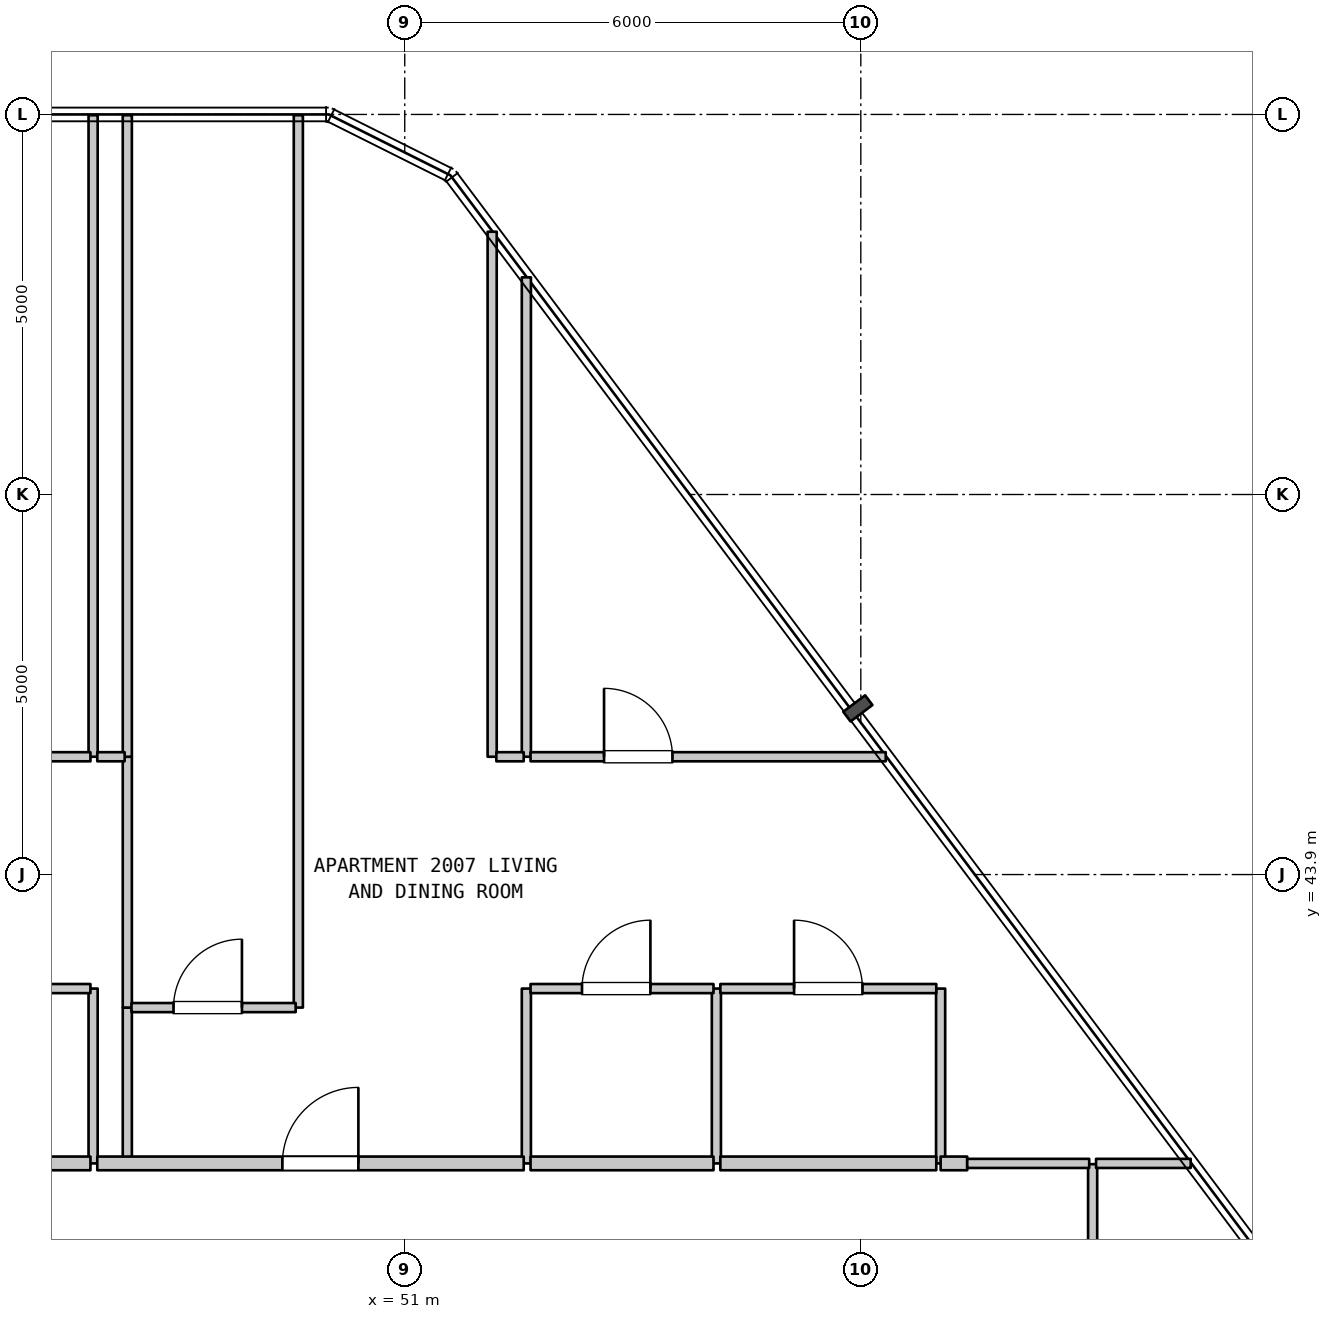
"""IFC4 building model, lengths in metres.
Left out: names, types, materials, properties, quantities, classifications, styles, units other than length and angle.
Written with IfcOpenShell. Run it as: python <this file> out.ifc"""

import sys

from ifc_helpers import new_model, si_unit, direction, frame, frame_2d, origin, place, context, subcontext, project, spatial, rectangle, extrude, element, fill, save


model = new_model("IFC4")
c1 = context("Model", 3, precision=1e-05, world=origin(), true_north=direction((0.0, 1.0)))
c2 = subcontext(c1, "Body", "Model", "MODEL_VIEW")
j1 = project(units=[si_unit("LENGTHUNIT", "METRE"), si_unit("PLANEANGLEUNIT", "RADIAN")], contexts=[c1])
p1 = place(None, origin())
s1 = spatial("IfcSite", under=j1, at=p1, CompositionType="ELEMENT")
p2 = place(p1, origin())
s2 = spatial("IfcBuilding", under=s1, at=p2, CompositionType="ELEMENT")
p3 = place(p2, frame((0.0, 0.0, 86.4)))
s3 = spatial("IfcBuildingStorey", under=s2, at=p3, CompositionType="ELEMENT", Elevation=86.4)
p4 = place(p3, frame((46.9, 40.1, 0.0), z_axis=(0.0, 0.0, 1.0), x_axis=(0.0, 1.0, 0.0)))
e1 = element("IfcWall", 1, at=p4, inside=s3, PredefinedType="PARTITIONING", context=c2, shape_type="SweptSolid", body=[
    extrude(rectangle(XDim=2.3, YDim=0.12, at=frame_2d((1.15, 0.0))), origin(), (0.0, 0.0, 1.0), 4.185),
])
p5 = place(p3, frame((46.9, 45.45, 0.0), z_axis=(0.0, 0.0, 1.0), x_axis=(0.0, 1.0, 0.0)))
e2 = element("IfcWall", 2, at=p5, inside=s3, PredefinedType="PARTITIONING", context=c2, shape_type="SweptSolid", body=[
    extrude(rectangle(XDim=8.44, YDim=0.12, at=frame_2d((4.22, 0.0))), origin(), (0.0, 0.0, 1.0), 4.185),
])
p6 = place(p3, frame((47.35, 40.1, 0.0), z_axis=(0.0, 0.0, 1.0), x_axis=(0.0, 1.0, 0.0)))
e3 = element("IfcWall", 3, at=p6, inside=s3, PredefinedType="PARTITIONING", context=c2, shape_type="SweptSolid", body=[
    extrude(rectangle(XDim=2.05, YDim=0.12, at=frame_2d((1.025, 0.0))), origin(), (0.0, 0.0, 1.0), 4.185),
])
p7 = place(p3, frame((47.35, 42.15, 0.0), z_axis=(0.0, 0.0, 1.0), x_axis=(0.0, 1.0, 0.0)))
e4 = element("IfcWall", 4, at=p7, inside=s3, PredefinedType="PARTITIONING", context=c2, shape_type="SweptSolid", body=[
    extrude(rectangle(XDim=3.3, YDim=0.12, at=frame_2d((1.65, 0.0))), origin(), (0.0, 0.0, 1.0), 4.185),
])
p8 = place(p3, frame((47.35, 45.45, 0.0), z_axis=(0.0, 0.0, 1.0), x_axis=(0.0, 1.0, 0.0)))
e5 = element("IfcWall", 5, at=p8, inside=s3, PredefinedType="PARTITIONING", context=c2, shape_type="SweptSolid", body=[
    extrude(rectangle(XDim=8.44, YDim=0.12, at=frame_2d((4.22, 0.0))), origin(), (0.0, 0.0, 1.0), 4.185),
])
p9 = place(p3, frame((49.6, 42.15, 0.0), z_axis=(0.0, 0.0, 1.0), x_axis=(0.0, 1.0, 0.0)))
e6 = element("IfcWall", 6, at=p9, inside=s3, PredefinedType="PARTITIONING", context=c2, shape_type="SweptSolid", body=[
    extrude(rectangle(XDim=11.74, YDim=0.12, at=frame_2d((5.87, 0.0))), origin(), (0.0, 0.0, 1.0), 4.185),
])
p10 = place(p3, frame((52.15, 45.45, 0.0), z_axis=(0.0, 0.0, 1.0), x_axis=(0.0, 1.0, 0.0)))
e7 = element("IfcWall", 7, at=p10, inside=s3, PredefinedType="PARTITIONING", context=c2, shape_type="SweptSolid", body=[
    extrude(rectangle(XDim=6.907, YDim=0.12, at=frame_2d((3.454, 0.0))), origin(), (0.0, 0.0, 1.0), 4.185),
])
p11 = place(p3, frame((52.6, 40.1, 0.0), z_axis=(0.0, 0.0, 1.0), x_axis=(0.0, 1.0, 0.0)))
e8 = element("IfcWall", 8, at=p11, inside=s3, PredefinedType="PARTITIONING", context=c2, shape_type="SweptSolid", body=[
    extrude(rectangle(XDim=2.3, YDim=0.12, at=frame_2d((1.15, 0.0))), origin(), (0.0, 0.0, 1.0), 4.185),
])
p12 = place(p3, frame((52.6, 45.45, 0.0), z_axis=(0.0, 0.0, 1.0), x_axis=(0.0, 1.0, 0.0)))
e9 = element("IfcWall", 9, at=p12, inside=s3, PredefinedType="PARTITIONING", context=c2, shape_type="SweptSolid", body=[
    extrude(rectangle(XDim=6.307, YDim=0.12, at=frame_2d((3.154, 0.0))), origin(), (0.0, 0.0, 1.0), 4.185),
])
for number, where, z_axis, x_axis in (
    (10, (55.1, 40.1, 0.0), (0.0, 0.0, 1.0), (0.0, 1.0, 0.0)),
    (11, (58.05, 40.1, 0.0), (0.0, 0.0, 1.0), (0.0, 1.0, 0.0)),
):
    element("IfcWall", number, at=place(p3, frame(where, z_axis=z_axis, x_axis=x_axis)), inside=s3, PredefinedType="PARTITIONING", context=c2, shape_type="SweptSolid", body=[
        extrude(rectangle(XDim=2.3, YDim=0.12, at=frame_2d((1.15, 0.0))), origin(), (0.0, 0.0, 1.0), 4.185),
    ])
p13 = place(p3, frame((60.05, 37.89, 0.0), z_axis=(0.0, 0.0, 1.0), x_axis=(0.0, 1.0, 0.0)))
e12 = element("IfcWall", 12, at=p13, inside=s3, PredefinedType="PARTITIONING", context=c2, shape_type="SweptSolid", body=[
    extrude(rectangle(XDim=2.2, YDim=0.12, at=frame_2d((1.1, 0.0))), origin(), (0.0, 0.0, 1.0), 4.185),
])
p14 = place(p3, frame((43.888, 40.1, 0.0), z_axis=(0.0, 0.0, 1.0), x_axis=(1.0, 0.0, 0.0)))
e13 = element("IfcWall", 13, at=p14, inside=s3, PredefinedType="STANDARD", context=c2, shape_type="SweptSolid", body=[
    extrude(rectangle(XDim=2.977, YDim=0.18, at=frame_2d((1.489, 0.0))), origin(), (0.0, 0.0, 1.0), 4.185),
])
p15 = place(p3, frame((46.955, 40.1, 0.0), z_axis=(0.0, 0.0, 1.0), x_axis=(1.0, 0.0, 0.0)))
e14 = element("IfcWall", 14, at=p15, inside=s3, PredefinedType="STANDARD", context=c2, shape_type="SweptSolid", body=[
    extrude(rectangle(XDim=5.61, YDim=0.18, at=frame_2d((2.805, 0.0))), origin(), (0.0, 0.0, 1.0), 4.185),
])
p16 = place(p15, frame((2.435, 0.0, 0.0)))
e15 = element("IfcOpeningElement", 15, at=p16, cuts=e14, PredefinedType="OPENING", context=c2, shape_type="SweptSolid", body=[
    extrude(rectangle(XDim=1.0, YDim=2.15, at=frame_2d((0.5, 1.075))), frame((0.0, 0.1, 0.0), z_axis=(0.0, -1.0, 0.0), x_axis=(1.0, 0.0, 0.0)), (0.0, 0.0, 1.0), 0.2),
])
p17 = place(p3, frame((52.655, 40.1, 0.0), z_axis=(0.0, 0.0, 1.0), x_axis=(1.0, 0.0, 0.0)))
e16 = element("IfcWall", 16, at=p17, inside=s3, PredefinedType="STANDARD", context=c2, shape_type="SweptSolid", body=[
    extrude(rectangle(XDim=2.407, YDim=0.18, at=frame_2d((1.204, 0.0))), origin(), (0.0, 0.0, 1.0), 4.185),
])
p18 = place(p3, frame((55.152, 40.1, 0.0), z_axis=(0.0, 0.0, 1.0), x_axis=(1.0, 0.0, 0.0)))
e17 = element("IfcWall", 17, at=p18, inside=s3, PredefinedType="STANDARD", context=c2, shape_type="SweptSolid", body=[
    extrude(rectangle(XDim=2.841, YDim=0.18, at=frame_2d((1.42, 0.0))), origin(), (0.0, 0.0, 1.0), 4.185),
])
p19 = place(p3, frame((58.05, 40.1, 0.0), z_axis=(0.0, 0.0, 1.0), x_axis=(1.0, 0.0, 0.0)))
e18 = element("IfcWall", 18, at=p19, inside=s3, PredefinedType="STANDARD", context=c2, shape_type="SweptSolid", body=[
    extrude(rectangle(XDim=0.35, YDim=0.18, at=frame_2d((0.175, 0.0))), origin(), (0.0, 0.0, 1.0), 4.185),
])
p20 = place(p3, frame((58.4, 40.1, 0.0), z_axis=(0.0, 0.0, 1.0), x_axis=(1.0, 0.0, 0.0)))
e19 = element("IfcWall", 19, at=p20, inside=s3, PredefinedType="PARTITIONING", context=c2, shape_type="SweptSolid", body=[
    extrude(rectangle(XDim=1.605, YDim=0.12, at=frame_2d((0.802, 0.0))), origin(), (0.0, 0.0, 1.0), 4.185),
])
p21 = place(p3, frame((60.095, 40.1, 0.0), z_axis=(0.0, 0.0, 1.0), x_axis=(1.0, 0.0, 0.0)))
e20 = element("IfcWall", 20, at=p21, inside=s3, PredefinedType="PARTITIONING", context=c2, shape_type="SweptSolid", body=[
    extrude(rectangle(XDim=1.245, YDim=0.12, at=frame_2d((0.623, 0.0))), origin(), (0.0, 0.0, 1.0), 4.185),
])
p22 = place(p3, frame((47.405, 42.15, 0.0), z_axis=(0.0, 0.0, 1.0), x_axis=(1.0, 0.0, 0.0)))
e21 = element("IfcWall", 21, at=p22, inside=s3, PredefinedType="PARTITIONING", context=c2, shape_type="SweptSolid", body=[
    extrude(rectangle(XDim=2.16, YDim=0.12, at=frame_2d((1.08, 0.0))), origin(), (0.0, 0.0, 1.0), 4.185),
])
p23 = place(p22, frame((0.553, 0.0, 0.0)))
e22 = element("IfcOpeningElement", 22, at=p23, cuts=e21, PredefinedType="OPENING", context=c2, shape_type="SweptSolid", body=[
    extrude(rectangle(XDim=0.9, YDim=2.15, at=frame_2d((0.45, 1.075))), frame((0.0, 0.07, 0.0), z_axis=(0.0, -1.0, 0.0), x_axis=(1.0, 0.0, 0.0)), (0.0, 0.0, 1.0), 0.14),
])
p24 = place(p3, frame((43.888, 42.4, 0.0), z_axis=(0.0, 0.0, 1.0), x_axis=(1.0, 0.0, 0.0)))
e23 = element("IfcWall", 23, at=p24, inside=s3, PredefinedType="PARTITIONING", context=c2, shape_type="SweptSolid", body=[
    extrude(rectangle(XDim=2.977, YDim=0.12, at=frame_2d((1.489, 0.0))), origin(), (0.0, 0.0, 1.0), 4.185),
])
p25 = place(p24, frame((0.964, 0.0, 0.0)))
e24 = element("IfcOpeningElement", 24, at=p25, cuts=e23, PredefinedType="OPENING", context=c2, shape_type="SweptSolid", body=[
    extrude(rectangle(XDim=0.9, YDim=2.15, at=frame_2d((0.45, 1.075))), frame((0.0, 0.07, 0.0), z_axis=(0.0, -1.0, 0.0), x_axis=(1.0, 0.0, 0.0)), (0.0, 0.0, 1.0), 0.14),
])
p26 = place(p3, frame((52.655, 42.4, 0.0), z_axis=(0.0, 0.0, 1.0), x_axis=(1.0, 0.0, 0.0)))
e25 = element("IfcWall", 25, at=p26, inside=s3, PredefinedType="PARTITIONING", context=c2, shape_type="SweptSolid", body=[
    extrude(rectangle(XDim=2.407, YDim=0.12, at=frame_2d((1.204, 0.0))), origin(), (0.0, 0.0, 1.0), 4.185),
])
p27 = place(p26, frame((0.677, 0.0, 0.0)))
e26 = element("IfcOpeningElement", 26, at=p27, cuts=e25, PredefinedType="OPENING", context=c2, shape_type="SweptSolid", body=[
    extrude(rectangle(XDim=0.9, YDim=2.15, at=frame_2d((0.45, 1.075))), frame((0.0, 0.07, 0.0), z_axis=(0.0, -1.0, 0.0), x_axis=(1.0, 0.0, 0.0)), (0.0, 0.0, 1.0), 0.14),
])
p28 = place(p3, frame((55.152, 42.4, 0.0), z_axis=(0.0, 0.0, 1.0), x_axis=(1.0, 0.0, 0.0)))
e27 = element("IfcWall", 27, at=p28, inside=s3, PredefinedType="PARTITIONING", context=c2, shape_type="SweptSolid", body=[
    extrude(rectangle(XDim=2.841, YDim=0.12, at=frame_2d((1.42, 0.0))), origin(), (0.0, 0.0, 1.0), 4.185),
])
p29 = place(p28, frame((0.97, 0.0, 0.0)))
e28 = element("IfcOpeningElement", 28, at=p29, cuts=e27, PredefinedType="OPENING", context=c2, shape_type="SweptSolid", body=[
    extrude(rectangle(XDim=0.9, YDim=2.1, at=frame_2d((0.45, 1.05))), frame((0.0, 0.07, 0.0), z_axis=(0.0, -1.0, 0.0), x_axis=(1.0, 0.0, 0.0)), (0.0, 0.0, 1.0), 0.14),
])
p30 = place(p3, frame((38.755, 45.45, 0.0), z_axis=(0.0, 0.0, 1.0), x_axis=(1.0, 0.0, 0.0)))
e29 = element("IfcWall", 29, at=p30, inside=s3, PredefinedType="PARTITIONING", context=c2, shape_type="SweptSolid", body=[
    extrude(rectangle(XDim=8.11, YDim=0.12, at=frame_2d((4.055, 0.0))), origin(), (0.0, 0.0, 1.0), 4.185),
])
p31 = place(p30, frame((0.975, 0.0, 0.0)))
e30 = element("IfcOpeningElement", 30, at=p31, cuts=e29, PredefinedType="OPENING", context=c2, shape_type="SweptSolid", body=[
    extrude(rectangle(XDim=0.9, YDim=2.15, at=frame_2d((0.45, 1.075))), frame((0.0, 0.07, 0.0), z_axis=(0.0, -1.0, 0.0), x_axis=(1.0, 0.0, 0.0)), (0.0, 0.0, 1.0), 0.14),
])
p32 = place(p30, frame((3.531, 0.0, 0.0)))
e31 = element("IfcOpeningElement", 31, at=p32, cuts=e29, PredefinedType="OPENING", context=c2, shape_type="SweptSolid", body=[
    extrude(rectangle(XDim=0.9, YDim=2.15, at=frame_2d((0.45, 1.075))), frame((0.0, 0.07, 0.0), z_axis=(0.0, -1.0, 0.0), x_axis=(1.0, 0.0, 0.0)), (0.0, 0.0, 1.0), 0.14),
])
p33 = place(p30, frame((6.092, 0.0, 0.0)))
e32 = element("IfcOpeningElement", 32, at=p33, cuts=e29, PredefinedType="OPENING", context=c2, shape_type="SweptSolid", body=[
    extrude(rectangle(XDim=0.9, YDim=2.15, at=frame_2d((0.45, 1.075))), frame((0.0, 0.07, 0.0), z_axis=(0.0, -1.0, 0.0), x_axis=(1.0, 0.0, 0.0)), (0.0, 0.0, 1.0), 0.14),
])
for number, where, z_axis, x_axis in (
    (33, (46.955, 45.45, 0.0), (0.0, 0.0, 1.0), (1.0, 0.0, 0.0)),
    (34, (52.205, 45.45, 0.0), (0.0, 0.0, 1.0), (1.0, 0.0, 0.0)),
):
    element("IfcWall", number, at=place(p3, frame(where, z_axis=z_axis, x_axis=x_axis)), inside=s3, PredefinedType="PARTITIONING", context=c2, shape_type="SweptSolid", body=[
        extrude(rectangle(XDim=0.36, YDim=0.12, at=frame_2d((0.18, 0.0))), origin(), (0.0, 0.0, 1.0), 4.185),
    ])
p34 = place(p3, frame((52.655, 45.45, 0.0), z_axis=(0.0, 0.0, 1.0), x_axis=(1.0, 0.0, 0.0)))
e35 = element("IfcWall", 35, at=p34, inside=s3, PredefinedType="PARTITIONING", context=c2, shape_type="SweptSolid", body=[
    extrude(rectangle(XDim=4.673, YDim=0.12, at=frame_2d((2.336, 0.0))), origin(), (0.0, 0.0, 1.0), 4.185),
])
p35 = place(p34, frame((0.967, 0.0, 0.0)))
e36 = element("IfcOpeningElement", 36, at=p35, cuts=e35, PredefinedType="OPENING", context=c2, shape_type="SweptSolid", body=[
    extrude(rectangle(XDim=0.9, YDim=2.15, at=frame_2d((0.45, 1.075))), frame((0.0, 0.07, 0.0), z_axis=(0.0, -1.0, 0.0), x_axis=(1.0, 0.0, 0.0)), (0.0, 0.0, 1.0), 0.14),
])
p36 = place(p16, origin())
e37 = element("IfcDoor", 37, at=p36, inside=s3, OperationType="SINGLE_SWING_RIGHT", PredefinedType="DOOR", context=c2, shape_type="SweptSolid", body=[
    extrude(rectangle(XDim=1.0, YDim=2.15, at=frame_2d((0.5, 1.075))), frame((0.0, 0.025, 0.0), z_axis=(0.0, -1.0, 0.0), x_axis=(1.0, 0.0, 0.0)), (0.0, 0.0, 1.0), 0.05),
])
fill(e15, e37)
p37 = place(p23, origin())
e38 = element("IfcDoor", 38, at=p37, inside=s3, OperationType="SINGLE_SWING_RIGHT", PredefinedType="DOOR", context=c2, shape_type="SweptSolid", body=[
    extrude(rectangle(XDim=0.9, YDim=2.15, at=frame_2d((0.45, 1.075))), frame((0.0, 0.025, 0.0), z_axis=(0.0, -1.0, 0.0), x_axis=(1.0, 0.0, 0.0)), (0.0, 0.0, 1.0), 0.05),
])
fill(e22, e38)
p38 = place(p27, origin())
e39 = element("IfcDoor", 39, at=p38, inside=s3, OperationType="SINGLE_SWING_RIGHT", PredefinedType="DOOR", context=c2, shape_type="SweptSolid", body=[
    extrude(rectangle(XDim=0.9, YDim=2.15, at=frame_2d((0.45, 1.075))), frame((0.0, 0.025, 0.0), z_axis=(0.0, -1.0, 0.0), x_axis=(1.0, 0.0, 0.0)), (0.0, 0.0, 1.0), 0.05),
])
fill(e26, e39)
p39 = place(p29, origin())
e40 = element("IfcDoor", 40, at=p39, inside=s3, OperationType="SINGLE_SWING_LEFT", PredefinedType="DOOR", context=c2, shape_type="SweptSolid", body=[
    extrude(rectangle(XDim=0.9, YDim=2.1, at=frame_2d((0.45, 1.05))), frame((0.0, 0.025, 0.0), z_axis=(0.0, -1.0, 0.0), x_axis=(1.0, 0.0, 0.0)), (0.0, 0.0, 1.0), 0.05),
])
fill(e28, e40)
p40 = place(p35, origin())
e41 = element("IfcDoor", 41, at=p40, inside=s3, OperationType="SINGLE_SWING_LEFT", PredefinedType="DOOR", context=c2, shape_type="SweptSolid", body=[
    extrude(rectangle(XDim=0.9, YDim=2.15, at=frame_2d((0.45, 1.075))), frame((0.0, 0.025, 0.0), z_axis=(0.0, -1.0, 0.0), x_axis=(1.0, 0.0, 0.0)), (0.0, 0.0, 1.0), 0.05),
])
fill(e36, e41)
save(model, sys.argv[1])
